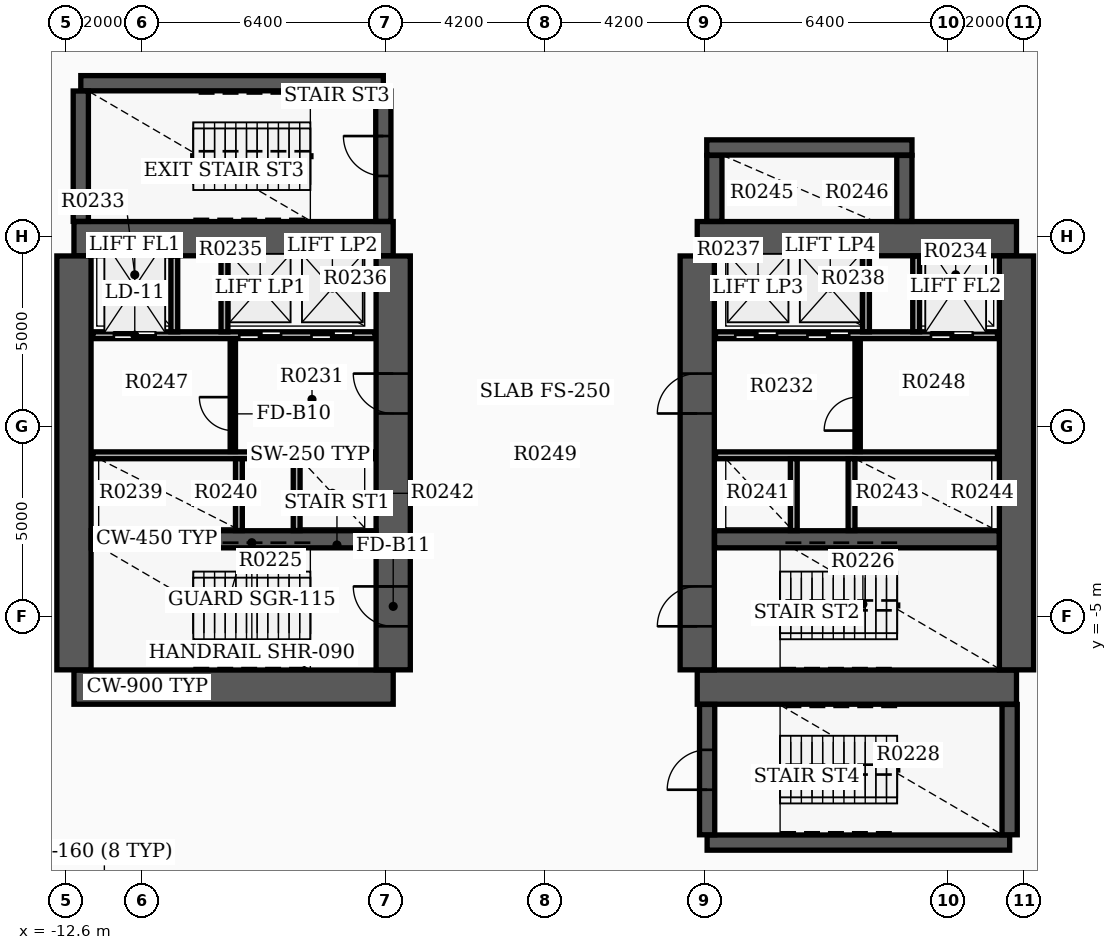
"""IFC4 building model, lengths in metres.
Left out: names, types, materials, properties, quantities, classifications, styles, units other than length and angle.
Written with IfcOpenShell. Run it as: python <this file> out.ifc"""

import sys

from ifc_helpers import new_model, si_unit, direction, frame, frame_2d, origin, place, context, subcontext, project, spatial, rectangle, extrude, element, fill, save


model = new_model("IFC4")
c1 = context("Model", 3, precision=1e-05, world=origin(), true_north=direction((0.0, 1.0)))
c2 = subcontext(c1, "Body", "Model", "MODEL_VIEW")
j1 = project(units=[si_unit("LENGTHUNIT", "METRE"), si_unit("PLANEANGLEUNIT", "RADIAN")], contexts=[c1])
p1 = place(None, origin())
s1 = spatial("IfcSite", under=j1, at=p1, CompositionType="ELEMENT")
p2 = place(p1, origin())
s2 = spatial("IfcBuilding", under=s1, at=p2, CompositionType="ELEMENT")
p3 = place(p2, frame((0.0, 0.0, 19.2)))
s3 = spatial("IfcBuildingStorey", under=s2, at=p3, CompositionType="ELEMENT", Elevation=19.2)
for number, where, z_axis, x_axis in (
    (1, (-12.4, -6.85, 0.0), (0.0, 0.0, 1.0), (1.0, 0.0, 0.0)),
    (2, (-12.4, 4.95, 0.0), (0.0, 0.0, 1.0), (1.0, 0.0, 0.0)),
):
    element("IfcWall", number, at=place(p3, frame(where, z_axis=z_axis, x_axis=x_axis)), inside=s3, PredefinedType="SHEAR", context=c2, shape_type="SweptSolid", body=[
        extrude(rectangle(XDim=8.4, YDim=0.9, at=frame_2d((4.2, 0.0))), origin(), (0.0, 0.0, 1.0), 4.3),
    ])
p4 = place(p3, frame((-12.4, -6.395, 0.0), z_axis=(0.0, 0.0, 1.0), x_axis=(0.0, 1.0, 0.0)))
e3 = element("IfcWall", 3, at=p4, inside=s3, PredefinedType="SHEAR", context=c2, shape_type="SweptSolid", body=[
    extrude(rectangle(XDim=10.89, YDim=0.9, at=frame_2d((5.445, 0.0))), origin(), (0.0, 0.0, 1.0), 4.3),
])
p5 = place(p3, frame((-4.0, -6.395, 0.0), z_axis=(0.0, 0.0, 1.0), x_axis=(0.0, 1.0, 0.0)))
e4 = element("IfcWall", 4, at=p5, inside=s3, PredefinedType="SHEAR", context=c2, shape_type="SweptSolid", body=[
    extrude(rectangle(XDim=10.89, YDim=0.9, at=frame_2d((5.445, 0.0))), origin(), (0.0, 0.0, 1.0), 4.3),
])
p6 = place(p5, frame((1.145, 0.0, 0.0)))
e5 = element("IfcOpeningElement", 5, at=p6, cuts=e4, PredefinedType="OPENING", context=c2, shape_type="SweptSolid", body=[
    extrude(rectangle(XDim=1.05, YDim=2.15, at=frame_2d((0.525, 1.075))), frame((0.0, 0.46, 0.0), z_axis=(0.0, -1.0, 0.0), x_axis=(1.0, 0.0, 0.0)), (0.0, 0.0, 1.0), 0.92),
])
p7 = place(p5, frame((6.745, 0.0, 0.0)))
e6 = element("IfcOpeningElement", 6, at=p7, cuts=e4, PredefinedType="OPENING", context=c2, shape_type="SweptSolid", body=[
    extrude(rectangle(XDim=1.05, YDim=2.15, at=frame_2d((0.525, 1.075))), frame((0.0, 0.46, 0.0), z_axis=(0.0, -1.0, 0.0), x_axis=(1.0, 0.0, 0.0)), (0.0, 0.0, 1.0), 0.92),
])
p8 = place(p3, frame((-11.945, -2.96, 0.0), z_axis=(0.0, 0.0, 1.0), x_axis=(1.0, 0.0, 0.0)))
e7 = element("IfcWall", 7, at=p8, inside=s3, PredefinedType="SHEAR", context=c2, shape_type="SweptSolid", body=[
    extrude(rectangle(XDim=7.49, YDim=0.45, at=frame_2d((3.745, 0.0))), origin(), (0.0, 0.0, 1.0), 4.3),
])
for number, where, z_axis, x_axis in (
    (8, (4.0, -6.85, 0.0), (0.0, 0.0, 1.0), (1.0, 0.0, 0.0)),
    (9, (4.0, 4.95, 0.0), (0.0, 0.0, 1.0), (1.0, 0.0, 0.0)),
):
    element("IfcWall", number, at=place(p3, frame(where, z_axis=z_axis, x_axis=x_axis)), inside=s3, PredefinedType="SHEAR", context=c2, shape_type="SweptSolid", body=[
        extrude(rectangle(XDim=8.4, YDim=0.9, at=frame_2d((4.2, 0.0))), origin(), (0.0, 0.0, 1.0), 4.3),
    ])
p9 = place(p3, frame((4.0, -6.395, 0.0), z_axis=(0.0, 0.0, 1.0), x_axis=(0.0, 1.0, 0.0)))
e10 = element("IfcWall", 10, at=p9, inside=s3, PredefinedType="SHEAR", context=c2, shape_type="SweptSolid", body=[
    extrude(rectangle(XDim=10.89, YDim=0.9, at=frame_2d((5.445, 0.0))), origin(), (0.0, 0.0, 1.0), 4.3),
])
p10 = place(p9, frame((1.145, 0.0, 0.0)))
e11 = element("IfcOpeningElement", 11, at=p10, cuts=e10, PredefinedType="OPENING", context=c2, shape_type="SweptSolid", body=[
    extrude(rectangle(XDim=1.05, YDim=2.15, at=frame_2d((0.525, 1.075))), frame((0.0, 0.46, 0.0), z_axis=(0.0, -1.0, 0.0), x_axis=(1.0, 0.0, 0.0)), (0.0, 0.0, 1.0), 0.92),
])
p11 = place(p9, frame((6.745, 0.0, 0.0)))
e12 = element("IfcOpeningElement", 12, at=p11, cuts=e10, PredefinedType="OPENING", context=c2, shape_type="SweptSolid", body=[
    extrude(rectangle(XDim=1.05, YDim=2.15, at=frame_2d((0.525, 1.075))), frame((0.0, 0.46, 0.0), z_axis=(0.0, -1.0, 0.0), x_axis=(1.0, 0.0, 0.0)), (0.0, 0.0, 1.0), 0.92),
])
p12 = place(p3, frame((12.4, -6.395, 0.0), z_axis=(0.0, 0.0, 1.0), x_axis=(0.0, 1.0, 0.0)))
e13 = element("IfcWall", 13, at=p12, inside=s3, PredefinedType="SHEAR", context=c2, shape_type="SweptSolid", body=[
    extrude(rectangle(XDim=10.89, YDim=0.9, at=frame_2d((5.445, 0.0))), origin(), (0.0, 0.0, 1.0), 4.3),
])
p13 = place(p3, frame((4.455, -2.96, 0.0), z_axis=(0.0, 0.0, 1.0), x_axis=(1.0, 0.0, 0.0)))
e14 = element("IfcWall", 14, at=p13, inside=s3, PredefinedType="SHEAR", context=c2, shape_type="SweptSolid", body=[
    extrude(rectangle(XDim=7.49, YDim=0.45, at=frame_2d((3.745, 0.0))), origin(), (0.0, 0.0, 1.0), 4.3),
])
p14 = place(p3, frame((-12.22, 9.04, 0.0), z_axis=(0.0, 0.0, 1.0), x_axis=(1.0, 0.0, 0.0)))
e15 = element("IfcWall", 15, at=p14, inside=s3, PredefinedType="SHEAR", context=c2, shape_type="SweptSolid", body=[
    extrude(rectangle(XDim=7.96, YDim=0.4, at=frame_2d((3.98, 0.0))), origin(), (0.0, 0.0, 1.0), 4.3),
])
p15 = place(p3, frame((-12.22, 5.405, 0.0), z_axis=(0.0, 0.0, 1.0), x_axis=(0.0, 1.0, 0.0)))
e16 = element("IfcWall", 16, at=p15, inside=s3, PredefinedType="SHEAR", context=c2, shape_type="SweptSolid", body=[
    extrude(rectangle(XDim=3.43, YDim=0.4, at=frame_2d((1.715, 0.0))), origin(), (0.0, 0.0, 1.0), 4.3),
])
p16 = place(p3, frame((-4.26, 5.405, 0.0), z_axis=(0.0, 0.0, 1.0), x_axis=(0.0, 1.0, 0.0)))
e17 = element("IfcWall", 17, at=p16, inside=s3, PredefinedType="SHEAR", context=c2, shape_type="SweptSolid", body=[
    extrude(rectangle(XDim=3.43, YDim=0.4, at=frame_2d((1.715, 0.0))), origin(), (0.0, 0.0, 1.0), 4.3),
])
p17 = place(p16, frame((1.195, 0.0, 0.0)))
e18 = element("IfcOpeningElement", 18, at=p17, cuts=e17, PredefinedType="OPENING", context=c2, shape_type="SweptSolid", body=[
    extrude(rectangle(XDim=1.05, YDim=2.15, at=frame_2d((0.525, 1.075))), frame((0.0, 0.21, 0.0), z_axis=(0.0, -1.0, 0.0), x_axis=(1.0, 0.0, 0.0)), (0.0, 0.0, 1.0), 0.42),
])
p18 = place(p3, frame((4.26, -10.94, 0.0), z_axis=(0.0, 0.0, 1.0), x_axis=(1.0, 0.0, 0.0)))
e19 = element("IfcWall", 19, at=p18, inside=s3, PredefinedType="SHEAR", context=c2, shape_type="SweptSolid", body=[
    extrude(rectangle(XDim=7.96, YDim=0.4, at=frame_2d((3.98, 0.0))), origin(), (0.0, 0.0, 1.0), 4.3),
])
p19 = place(p3, frame((4.26, -10.735, 0.0), z_axis=(0.0, 0.0, 1.0), x_axis=(0.0, 1.0, 0.0)))
e20 = element("IfcWall", 20, at=p19, inside=s3, PredefinedType="SHEAR", context=c2, shape_type="SweptSolid", body=[
    extrude(rectangle(XDim=3.43, YDim=0.4, at=frame_2d((1.715, 0.0))), origin(), (0.0, 0.0, 1.0), 4.3),
])
p20 = place(p19, frame((1.185, 0.0, 0.0)))
e21 = element("IfcOpeningElement", 21, at=p20, cuts=e20, PredefinedType="OPENING", context=c2, shape_type="SweptSolid", body=[
    extrude(rectangle(XDim=1.05, YDim=2.15, at=frame_2d((0.525, 1.075))), frame((0.0, 0.21, 0.0), z_axis=(0.0, -1.0, 0.0), x_axis=(1.0, 0.0, 0.0)), (0.0, 0.0, 1.0), 0.42),
])
p21 = place(p3, frame((12.22, -10.735, 0.0), z_axis=(0.0, 0.0, 1.0), x_axis=(0.0, 1.0, 0.0)))
e22 = element("IfcWall", 22, at=p21, inside=s3, PredefinedType="SHEAR", context=c2, shape_type="SweptSolid", body=[
    extrude(rectangle(XDim=3.43, YDim=0.4, at=frame_2d((1.715, 0.0))), origin(), (0.0, 0.0, 1.0), 4.3),
])
p22 = place(p3, frame((4.45, 5.405, 0.0), z_axis=(0.0, 0.0, 1.0), x_axis=(0.0, 1.0, 0.0)))
e23 = element("IfcWall", 23, at=p22, inside=s3, PredefinedType="SHEAR", context=c2, shape_type="SweptSolid", body=[
    extrude(rectangle(XDim=1.735, YDim=0.4, at=frame_2d((0.867, 0.0))), origin(), (0.0, 0.0, 1.0), 4.3),
])
p23 = place(p3, frame((4.25, 7.35, 0.0), z_axis=(0.0, 0.0, 1.0), x_axis=(1.0, 0.0, 0.0)))
e24 = element("IfcWall", 24, at=p23, inside=s3, PredefinedType="SHEAR", context=c2, shape_type="SweptSolid", body=[
    extrude(rectangle(XDim=5.4, YDim=0.4, at=frame_2d((2.7, 0.0))), origin(), (0.0, 0.0, 1.0), 4.3),
])
p24 = place(p3, frame((9.45, 5.405, 0.0), z_axis=(0.0, 0.0, 1.0), x_axis=(0.0, 1.0, 0.0)))
e25 = element("IfcWall", 25, at=p24, inside=s3, PredefinedType="SHEAR", context=c2, shape_type="SweptSolid", body=[
    extrude(rectangle(XDim=1.735, YDim=0.4, at=frame_2d((0.867, 0.0))), origin(), (0.0, 0.0, 1.0), 4.3),
])
p25 = place(p3, frame((-11.9, 2.41, 0.0), z_axis=(0.0, 0.0, 1.0), x_axis=(1.0, 0.0, 0.0)))
e26 = element("IfcWall", 26, at=p25, inside=s3, PredefinedType="SOLIDWALL", context=c2, shape_type="SweptSolid", body=[
    extrude(rectangle(XDim=7.42, YDim=0.18, at=frame_2d((3.71, 0.0))), origin(), (0.0, 0.0, 1.0), 3.37),
])
p26 = place(p25, frame((0.55, 0.0, 0.0)))
e27 = element("IfcOpeningElement", 27, at=p26, cuts=e26, PredefinedType="OPENING", context=c2, shape_type="SweptSolid", body=[
    extrude(rectangle(XDim=1.1, YDim=2.15, at=frame_2d((0.55, 1.075))), frame((0.0, 0.1, 0.0), z_axis=(0.0, -1.0, 0.0), x_axis=(1.0, 0.0, 0.0)), (0.0, 0.0, 1.0), 0.2),
])
p27 = place(p25, frame((3.85, 0.0, 0.0)))
e28 = element("IfcOpeningElement", 28, at=p27, cuts=e26, PredefinedType="OPENING", context=c2, shape_type="SweptSolid", body=[
    extrude(rectangle(XDim=1.1, YDim=2.15, at=frame_2d((0.55, 1.075))), frame((0.0, 0.1, 0.0), z_axis=(0.0, -1.0, 0.0), x_axis=(1.0, 0.0, 0.0)), (0.0, 0.0, 1.0), 0.2),
])
p28 = place(p25, frame((5.75, 0.0, 0.0)))
e29 = element("IfcOpeningElement", 29, at=p28, cuts=e26, PredefinedType="OPENING", context=c2, shape_type="SweptSolid", body=[
    extrude(rectangle(XDim=1.1, YDim=2.15, at=frame_2d((0.55, 1.075))), frame((0.0, 0.1, 0.0), z_axis=(0.0, -1.0, 0.0), x_axis=(1.0, 0.0, 0.0)), (0.0, 0.0, 1.0), 0.2),
])
p29 = place(p3, frame((4.48, 2.41, 0.0), z_axis=(0.0, 0.0, 1.0), x_axis=(1.0, 0.0, 0.0)))
e30 = element("IfcWall", 30, at=p29, inside=s3, PredefinedType="SOLIDWALL", context=c2, shape_type="SweptSolid", body=[
    extrude(rectangle(XDim=7.42, YDim=0.18, at=frame_2d((3.71, 0.0))), origin(), (0.0, 0.0, 1.0), 3.37),
])
p30 = place(p29, frame((5.67, 0.0, 0.0)))
e31 = element("IfcOpeningElement", 31, at=p30, cuts=e30, PredefinedType="OPENING", context=c2, shape_type="SweptSolid", body=[
    extrude(rectangle(XDim=1.1, YDim=2.15, at=frame_2d((0.55, 1.075))), frame((0.0, 0.1, 0.0), z_axis=(0.0, -1.0, 0.0), x_axis=(1.0, 0.0, 0.0)), (0.0, 0.0, 1.0), 0.2),
])
p31 = place(p29, frame((0.52, 0.0, 0.0)))
e32 = element("IfcOpeningElement", 32, at=p31, cuts=e30, PredefinedType="OPENING", context=c2, shape_type="SweptSolid", body=[
    extrude(rectangle(XDim=1.1, YDim=2.15, at=frame_2d((0.55, 1.075))), frame((0.0, 0.1, 0.0), z_axis=(0.0, -1.0, 0.0), x_axis=(1.0, 0.0, 0.0)), (0.0, 0.0, 1.0), 0.2),
])
p32 = place(p29, frame((2.42, 0.0, 0.0)))
e33 = element("IfcOpeningElement", 33, at=p32, cuts=e30, PredefinedType="OPENING", context=c2, shape_type="SweptSolid", body=[
    extrude(rectangle(XDim=1.1, YDim=2.15, at=frame_2d((0.55, 1.075))), frame((0.0, 0.1, 0.0), z_axis=(0.0, -1.0, 0.0), x_axis=(1.0, 0.0, 0.0)), (0.0, 0.0, 1.0), 0.2),
])
for number, where, z_axis, x_axis in (
    (34, (-11.9, -0.75, 0.0), (0.0, 0.0, 1.0), (1.0, 0.0, 0.0)),
    (35, (4.48, -0.75, 0.0), (0.0, 0.0, 1.0), (1.0, 0.0, 0.0)),
):
    element("IfcWall", number, at=place(p3, frame(where, z_axis=z_axis, x_axis=x_axis)), inside=s3, PredefinedType="SOLIDWALL", context=c2, shape_type="SweptSolid", body=[
        extrude(rectangle(XDim=7.42, YDim=0.18, at=frame_2d((3.71, 0.0))), origin(), (0.0, 0.0, 1.0), 3.37),
    ])
for number, where, z_axis, x_axis in (
    (36, (-9.76, 2.5, 0.0), (0.0, 0.0, 1.0), (0.0, 1.0, 0.0)),
    (37, (-8.44, 2.5, 0.0), (0.0, 0.0, 1.0), (0.0, 1.0, 0.0)),
    (38, (8.44, 2.5, 0.0), (0.0, 0.0, 1.0), (0.0, 1.0, 0.0)),
    (39, (9.76, 2.5, 0.0), (0.0, 0.0, 1.0), (0.0, 1.0, 0.0)),
):
    element("IfcWall", number, at=place(p3, frame(where, z_axis=z_axis, x_axis=x_axis)), inside=s3, PredefinedType="SOLIDWALL", context=c2, shape_type="SweptSolid", body=[
        extrude(rectangle(XDim=1.99, YDim=0.18, at=frame_2d((0.995, 0.0))), origin(), (0.0, 0.0, 1.0), 3.37),
    ])
for number, where, z_axis, x_axis in (
    (40, (-8.06, -2.73, 0.0), (0.0, 0.0, 1.0), (0.0, 1.0, 0.0)),
    (41, (-6.54, -2.73, 0.0), (0.0, 0.0, 1.0), (0.0, 1.0, 0.0)),
    (42, (6.54, -2.73, 0.0), (0.0, 0.0, 1.0), (0.0, 1.0, 0.0)),
    (43, (8.06, -2.73, 0.0), (0.0, 0.0, 1.0), (0.0, 1.0, 0.0)),
):
    element("IfcWall", number, at=place(p3, frame(where, z_axis=z_axis, x_axis=x_axis)), inside=s3, PredefinedType="SOLIDWALL", context=c2, shape_type="SweptSolid", body=[
        extrude(rectangle(XDim=1.89, YDim=0.18, at=frame_2d((0.945, 0.0))), origin(), (0.0, 0.0, 1.0), 3.37),
    ])
p33 = place(p3, frame((-8.22, -0.65, 0.0), z_axis=(0.0, 0.0, 1.0), x_axis=(0.0, 1.0, 0.0)))
e44 = element("IfcWall", 44, at=p33, inside=s3, PredefinedType="SOLIDWALL", context=c2, shape_type="SweptSolid", body=[
    extrude(rectangle(XDim=2.96, YDim=0.14, at=frame_2d((1.48, 0.0))), origin(), (0.0, 0.0, 1.0), 3.37),
])
p34 = place(p33, frame((0.55, 0.0, 0.0)))
e45 = element("IfcOpeningElement", 45, at=p34, cuts=e44, PredefinedType="OPENING", context=c2, shape_type="SweptSolid", body=[
    extrude(rectangle(XDim=0.88, YDim=2.1, at=frame_2d((0.44, 1.05))), frame((0.0, 0.08, 0.0), z_axis=(0.0, -1.0, 0.0), x_axis=(1.0, 0.0, 0.0)), (0.0, 0.0, 1.0), 0.16),
])
p35 = place(p3, frame((8.22, -0.65, 0.0), z_axis=(0.0, 0.0, 1.0), x_axis=(0.0, 1.0, 0.0)))
e46 = element("IfcWall", 46, at=p35, inside=s3, PredefinedType="SOLIDWALL", context=c2, shape_type="SweptSolid", body=[
    extrude(rectangle(XDim=2.96, YDim=0.14, at=frame_2d((1.48, 0.0))), origin(), (0.0, 0.0, 1.0), 3.37),
])
p36 = place(p35, frame((0.55, 0.0, 0.0)))
e47 = element("IfcOpeningElement", 47, at=p36, cuts=e46, PredefinedType="OPENING", context=c2, shape_type="SweptSolid", body=[
    extrude(rectangle(XDim=0.88, YDim=2.1, at=frame_2d((0.44, 1.05))), frame((0.0, 0.08, 0.0), z_axis=(0.0, -1.0, 0.0), x_axis=(1.0, 0.0, 0.0)), (0.0, 0.0, 1.0), 0.16),
])
p37 = place(p6, origin())
e48 = element("IfcDoor", 48, at=p37, inside=s3, OperationType="SINGLE_SWING_RIGHT", PredefinedType="DOOR", context=c2, shape_type="SweptSolid", body=[
    extrude(rectangle(XDim=1.05, YDim=2.15, at=frame_2d((0.525, 1.075))), frame((0.0, 0.025, 0.0), z_axis=(0.0, -1.0, 0.0), x_axis=(1.0, 0.0, 0.0)), (0.0, 0.0, 1.0), 0.05),
])
fill(e5, e48)
p38 = place(p10, origin())
e49 = element("IfcDoor", 49, at=p38, inside=s3, OperationType="SINGLE_SWING_LEFT", PredefinedType="DOOR", context=c2, shape_type="SweptSolid", body=[
    extrude(rectangle(XDim=1.05, YDim=2.15, at=frame_2d((0.525, 1.075))), frame((0.0, 0.025, 0.0), z_axis=(0.0, -1.0, 0.0), x_axis=(1.0, 0.0, 0.0)), (0.0, 0.0, 1.0), 0.05),
])
fill(e11, e49)
p39 = place(p7, origin())
e50 = element("IfcDoor", 50, at=p39, inside=s3, OperationType="SINGLE_SWING_RIGHT", PredefinedType="DOOR", context=c2, shape_type="SweptSolid", body=[
    extrude(rectangle(XDim=1.05, YDim=2.15, at=frame_2d((0.525, 1.075))), frame((0.0, 0.025, 0.0), z_axis=(0.0, -1.0, 0.0), x_axis=(1.0, 0.0, 0.0)), (0.0, 0.0, 1.0), 0.05),
])
fill(e6, e50)
p40 = place(p11, origin())
e51 = element("IfcDoor", 51, at=p40, inside=s3, OperationType="SINGLE_SWING_LEFT", PredefinedType="DOOR", context=c2, shape_type="SweptSolid", body=[
    extrude(rectangle(XDim=1.05, YDim=2.15, at=frame_2d((0.525, 1.075))), frame((0.0, 0.025, 0.0), z_axis=(0.0, -1.0, 0.0), x_axis=(1.0, 0.0, 0.0)), (0.0, 0.0, 1.0), 0.05),
])
fill(e12, e51)
p41 = place(p17, origin())
e52 = element("IfcDoor", 52, at=p41, inside=s3, OperationType="SINGLE_SWING_RIGHT", PredefinedType="DOOR", context=c2, shape_type="SweptSolid", body=[
    extrude(rectangle(XDim=1.05, YDim=2.15, at=frame_2d((0.525, 1.075))), frame((0.0, 0.025, 0.0), z_axis=(0.0, -1.0, 0.0), x_axis=(1.0, 0.0, 0.0)), (0.0, 0.0, 1.0), 0.05),
])
fill(e18, e52)
p42 = place(p20, origin())
e53 = element("IfcDoor", 53, at=p42, inside=s3, OperationType="SINGLE_SWING_LEFT", PredefinedType="DOOR", context=c2, shape_type="SweptSolid", body=[
    extrude(rectangle(XDim=1.05, YDim=2.15, at=frame_2d((0.525, 1.075))), frame((0.0, 0.025, 0.0), z_axis=(0.0, -1.0, 0.0), x_axis=(1.0, 0.0, 0.0)), (0.0, 0.0, 1.0), 0.05),
])
fill(e21, e53)
p43 = place(p26, origin())
e54 = element("IfcDoor", 54, at=p43, inside=s3, OperationType="DOUBLE_DOOR_SLIDING", PredefinedType="DOOR", context=c2, shape_type="SweptSolid", body=[
    extrude(rectangle(XDim=1.1, YDim=2.15, at=frame_2d((0.55, 1.075))), frame((0.0, 0.025, 0.0), z_axis=(0.0, -1.0, 0.0), x_axis=(1.0, 0.0, 0.0)), (0.0, 0.0, 1.0), 0.05),
])
fill(e27, e54)
p44 = place(p30, origin())
e55 = element("IfcDoor", 55, at=p44, inside=s3, OperationType="DOUBLE_DOOR_SLIDING", PredefinedType="DOOR", context=c2, shape_type="SweptSolid", body=[
    extrude(rectangle(XDim=1.1, YDim=2.15, at=frame_2d((0.55, 1.075))), frame((0.0, 0.025, 0.0), z_axis=(0.0, -1.0, 0.0), x_axis=(1.0, 0.0, 0.0)), (0.0, 0.0, 1.0), 0.05),
])
fill(e31, e55)
p45 = place(p27, origin())
e56 = element("IfcDoor", 56, at=p45, inside=s3, OperationType="DOUBLE_DOOR_SLIDING", PredefinedType="DOOR", context=c2, shape_type="SweptSolid", body=[
    extrude(rectangle(XDim=1.1, YDim=2.15, at=frame_2d((0.55, 1.075))), frame((0.0, 0.025, 0.0), z_axis=(0.0, -1.0, 0.0), x_axis=(1.0, 0.0, 0.0)), (0.0, 0.0, 1.0), 0.05),
])
fill(e28, e56)
p46 = place(p28, origin())
e57 = element("IfcDoor", 57, at=p46, inside=s3, OperationType="DOUBLE_DOOR_SLIDING", PredefinedType="DOOR", context=c2, shape_type="SweptSolid", body=[
    extrude(rectangle(XDim=1.1, YDim=2.15, at=frame_2d((0.55, 1.075))), frame((0.0, 0.025, 0.0), z_axis=(0.0, -1.0, 0.0), x_axis=(1.0, 0.0, 0.0)), (0.0, 0.0, 1.0), 0.05),
])
fill(e29, e57)
p47 = place(p31, origin())
e58 = element("IfcDoor", 58, at=p47, inside=s3, OperationType="DOUBLE_DOOR_SLIDING", PredefinedType="DOOR", context=c2, shape_type="SweptSolid", body=[
    extrude(rectangle(XDim=1.1, YDim=2.15, at=frame_2d((0.55, 1.075))), frame((0.0, 0.025, 0.0), z_axis=(0.0, -1.0, 0.0), x_axis=(1.0, 0.0, 0.0)), (0.0, 0.0, 1.0), 0.05),
])
fill(e32, e58)
p48 = place(p32, origin())
e59 = element("IfcDoor", 59, at=p48, inside=s3, OperationType="DOUBLE_DOOR_SLIDING", PredefinedType="DOOR", context=c2, shape_type="SweptSolid", body=[
    extrude(rectangle(XDim=1.1, YDim=2.15, at=frame_2d((0.55, 1.075))), frame((0.0, 0.025, 0.0), z_axis=(0.0, -1.0, 0.0), x_axis=(1.0, 0.0, 0.0)), (0.0, 0.0, 1.0), 0.05),
])
fill(e33, e59)
p49 = place(p34, origin())
e60 = element("IfcDoor", 60, at=p49, inside=s3, OperationType="SINGLE_SWING_RIGHT", PredefinedType="DOOR", context=c2, shape_type="SweptSolid", body=[
    extrude(rectangle(XDim=0.88, YDim=2.1, at=frame_2d((0.44, 1.05))), frame((0.0, 0.025, 0.0), z_axis=(0.0, -1.0, 0.0), x_axis=(1.0, 0.0, 0.0)), (0.0, 0.0, 1.0), 0.05),
])
fill(e45, e60)
p50 = place(p36, origin())
e61 = element("IfcDoor", 61, at=p50, inside=s3, OperationType="SINGLE_SWING_LEFT", PredefinedType="DOOR", context=c2, shape_type="SweptSolid", body=[
    extrude(rectangle(XDim=0.88, YDim=2.1, at=frame_2d((0.44, 1.05))), frame((0.0, 0.025, 0.0), z_axis=(0.0, -1.0, 0.0), x_axis=(1.0, 0.0, 0.0)), (0.0, 0.0, 1.0), 0.05),
])
fill(e47, e61)
save(model, sys.argv[1])
